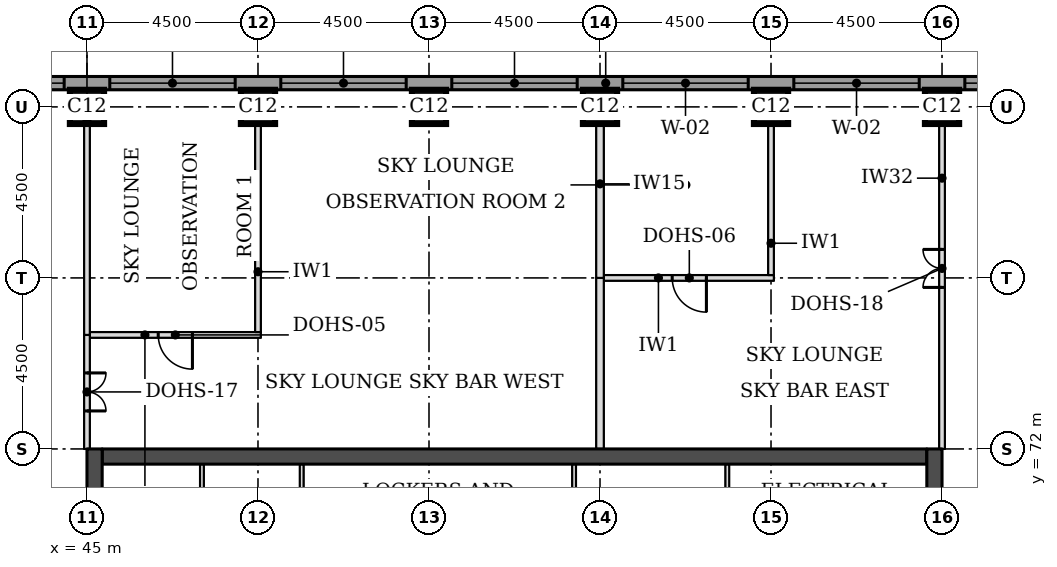
"""IFC4 building model, lengths in metres.
Left out: names, types, materials, properties, quantities, classifications, styles, units other than length and angle.
Written with IfcOpenShell. Run it as: python <this file> out.ifc"""

import sys

from ifc_helpers import new_model, si_unit, direction, frame, frame_2d, origin, origin_2d, place, context, subcontext, project, spatial, rectangle, extrude, element, fill, save


model = new_model("IFC4")
c1 = context("Model", 3, precision=1e-05, world=origin(), true_north=direction((0.0, 1.0)))
c2 = subcontext(c1, "Body", "Model", "MODEL_VIEW")
j1 = project(units=[si_unit("LENGTHUNIT", "METRE"), si_unit("PLANEANGLEUNIT", "RADIAN")], contexts=[c1])
p1 = place(None, origin())
s1 = spatial("IfcSite", under=j1, at=p1, CompositionType="ELEMENT")
p2 = place(p1, origin())
s2 = spatial("IfcBuilding", under=s1, at=p2, CompositionType="ELEMENT")
p3 = place(p2, frame((0.0, 0.0, 260.0)))
s3 = spatial("IfcBuildingStorey", under=s2, at=p3, CompositionType="ELEMENT", Elevation=260.0)
for number, where, z_axis, x_axis in (
    (1, (45.0, 81.0, 0.0), (0.0, 0.0, 1.0), (1.0, 0.0, 0.0)),
    (2, (49.5, 81.0, 0.0), (0.0, 0.0, 1.0), (1.0, 0.0, 0.0)),
    (3, (54.0, 81.0, 0.0), (0.0, 0.0, 1.0), (1.0, 0.0, 0.0)),
    (4, (58.5, 81.0, 0.0), (0.0, 0.0, 1.0), (1.0, 0.0, 0.0)),
    (5, (63.0, 81.0, 0.0), (0.0, 0.0, 1.0), (1.0, 0.0, 0.0)),
    (6, (67.5, 81.0, 0.0), (0.0, 0.0, 1.0), (1.0, 0.0, 0.0)),
):
    element("IfcColumn", number, at=place(p3, frame(where, z_axis=z_axis, x_axis=x_axis)), inside=s3, PredefinedType="COLUMN", context=c2, shape_type="SweptSolid", body=[
        extrude(rectangle(XDim=0.9, YDim=0.9, at=origin_2d()), origin(), (0.0, 0.0, 1.0), 3.7),
    ])
p4 = place(p3, frame((45.4, 71.8, 0.0), z_axis=(0.0, 0.0, 1.0), x_axis=(1.0, 0.0, 0.0)))
e7 = element("IfcWall", 7, at=p4, inside=s3, PredefinedType="SHEAR", context=c2, shape_type="SweptSolid", body=[
    extrude(rectangle(XDim=21.7, YDim=0.4, at=frame_2d((10.85, 0.0))), origin(), (0.0, 0.0, 1.0), 3.7),
])
p5 = place(p3, frame((45.2, 49.5, 0.0), z_axis=(0.0, 0.0, 1.0), x_axis=(0.0, 1.0, 0.0)))
e8 = element("IfcWall", 8, at=p5, inside=s3, PredefinedType="SHEAR", context=c2, shape_type="SweptSolid", body=[
    extrude(rectangle(XDim=22.5, YDim=0.4, at=frame_2d((11.25, 0.0))), origin(), (0.0, 0.0, 1.0), 3.7),
])
p6 = place(p5, frame((4.2, 0.0, 0.0)))
e9 = element("IfcOpeningElement", 9, at=p6, cuts=e8, PredefinedType="OPENING", context=c2, shape_type="SweptSolid", body=[
    extrude(rectangle(XDim=1.8, YDim=2.1, at=frame_2d((0.9, 1.05))), frame((0.0, 0.21, 0.0), z_axis=(0.0, -1.0, 0.0), x_axis=(1.0, 0.0, 0.0)), (0.0, 0.0, 1.0), 0.42),
])
p7 = place(p5, frame((6.9, 0.0, 0.0)))
e10 = element("IfcOpeningElement", 10, at=p7, cuts=e8, PredefinedType="OPENING", context=c2, shape_type="SweptSolid", body=[
    extrude(rectangle(XDim=1.1, YDim=2.1, at=frame_2d((0.55, 1.05))), frame((0.0, 0.21, 0.0), z_axis=(0.0, -1.0, 0.0), x_axis=(1.0, 0.0, 0.0)), (0.0, 0.0, 1.0), 0.42),
])
p8 = place(p5, frame((13.6, 0.0, 0.0)))
e11 = element("IfcOpeningElement", 11, at=p8, cuts=e8, PredefinedType="OPENING", context=c2, shape_type="SweptSolid", body=[
    extrude(rectangle(XDim=1.1, YDim=2.1, at=frame_2d((0.55, 1.05))), frame((0.0, 0.21, 0.0), z_axis=(0.0, -1.0, 0.0), x_axis=(1.0, 0.0, 0.0)), (0.0, 0.0, 1.0), 0.42),
])
p9 = place(p5, frame((16.5, 0.0, 0.0)))
e12 = element("IfcOpeningElement", 12, at=p9, cuts=e8, PredefinedType="OPENING", context=c2, shape_type="SweptSolid", body=[
    extrude(rectangle(XDim=1.8, YDim=2.1, at=frame_2d((0.9, 1.05))), frame((0.0, 0.21, 0.0), z_axis=(0.0, -1.0, 0.0), x_axis=(1.0, 0.0, 0.0)), (0.0, 0.0, 1.0), 0.42),
])
p10 = place(p3, frame((67.3, 49.5, 0.0), z_axis=(0.0, 0.0, 1.0), x_axis=(0.0, 1.0, 0.0)))
e13 = element("IfcWall", 13, at=p10, inside=s3, PredefinedType="SHEAR", context=c2, shape_type="SweptSolid", body=[
    extrude(rectangle(XDim=22.5, YDim=0.4, at=frame_2d((11.25, 0.0))), origin(), (0.0, 0.0, 1.0), 3.7),
])
p11 = place(p10, frame((4.2, 0.0, 0.0)))
e14 = element("IfcOpeningElement", 14, at=p11, cuts=e13, PredefinedType="OPENING", context=c2, shape_type="SweptSolid", body=[
    extrude(rectangle(XDim=1.8, YDim=2.1, at=frame_2d((0.9, 1.05))), frame((0.0, 0.21, 0.0), z_axis=(0.0, -1.0, 0.0), x_axis=(1.0, 0.0, 0.0)), (0.0, 0.0, 1.0), 0.42),
])
p12 = place(p10, frame((6.9, 0.0, 0.0)))
e15 = element("IfcOpeningElement", 15, at=p12, cuts=e13, PredefinedType="OPENING", context=c2, shape_type="SweptSolid", body=[
    extrude(rectangle(XDim=1.1, YDim=2.1, at=frame_2d((0.55, 1.05))), frame((0.0, 0.21, 0.0), z_axis=(0.0, -1.0, 0.0), x_axis=(1.0, 0.0, 0.0)), (0.0, 0.0, 1.0), 0.42),
])
p13 = place(p10, frame((13.6, 0.0, 0.0)))
e16 = element("IfcOpeningElement", 16, at=p13, cuts=e13, PredefinedType="OPENING", context=c2, shape_type="SweptSolid", body=[
    extrude(rectangle(XDim=1.1, YDim=2.1, at=frame_2d((0.55, 1.05))), frame((0.0, 0.21, 0.0), z_axis=(0.0, -1.0, 0.0), x_axis=(1.0, 0.0, 0.0)), (0.0, 0.0, 1.0), 0.42),
])
p14 = place(p10, frame((16.5, 0.0, 0.0)))
e17 = element("IfcOpeningElement", 17, at=p14, cuts=e13, PredefinedType="OPENING", context=c2, shape_type="SweptSolid", body=[
    extrude(rectangle(XDim=1.8, YDim=2.1, at=frame_2d((0.9, 1.05))), frame((0.0, 0.21, 0.0), z_axis=(0.0, -1.0, 0.0), x_axis=(1.0, 0.0, 0.0)), (0.0, 0.0, 1.0), 0.42),
])
p15 = place(p3, frame((72.331, 81.625, 0.0), z_axis=(0.0, 0.0, 1.0), x_axis=(-1.0, 0.0, 0.0)))
e18 = element("IfcWall", 18, at=p15, inside=s3, PredefinedType="STANDARD", context=c2, shape_type="SweptSolid", body=[
    extrude(rectangle(XDim=32.163, YDim=0.35, at=frame_2d((16.081, 0.0))), origin(), (0.0, 0.0, 1.0), 3.425),
])
p16 = place(p15, frame((0.931, 0.0, 0.9)))
e19 = element("IfcOpeningElement", 19, at=p16, cuts=e18, PredefinedType="OPENING", context=c2, shape_type="SweptSolid", body=[
    extrude(rectangle(XDim=3.3, YDim=1.9, at=frame_2d((1.65, 0.95))), frame((0.0, 0.185, 0.0), z_axis=(0.0, -1.0, 0.0), x_axis=(1.0, 0.0, 0.0)), (0.0, 0.0, 1.0), 0.37),
])
p17 = place(p15, frame((5.431, 0.0, 0.9)))
e20 = element("IfcOpeningElement", 20, at=p17, cuts=e18, PredefinedType="OPENING", context=c2, shape_type="SweptSolid", body=[
    extrude(rectangle(XDim=3.3, YDim=1.9, at=frame_2d((1.65, 0.95))), frame((0.0, 0.185, 0.0), z_axis=(0.0, -1.0, 0.0), x_axis=(1.0, 0.0, 0.0)), (0.0, 0.0, 1.0), 0.37),
])
p18 = place(p15, frame((9.931, 0.0, 0.9)))
e21 = element("IfcOpeningElement", 21, at=p18, cuts=e18, PredefinedType="OPENING", context=c2, shape_type="SweptSolid", body=[
    extrude(rectangle(XDim=3.3, YDim=1.9, at=frame_2d((1.65, 0.95))), frame((0.0, 0.185, 0.0), z_axis=(0.0, -1.0, 0.0), x_axis=(1.0, 0.0, 0.0)), (0.0, 0.0, 1.0), 0.37),
])
p19 = place(p15, frame((14.431, 0.0, 0.9)))
e22 = element("IfcOpeningElement", 22, at=p19, cuts=e18, PredefinedType="OPENING", context=c2, shape_type="SweptSolid", body=[
    extrude(rectangle(XDim=3.3, YDim=1.9, at=frame_2d((1.65, 0.95))), frame((0.0, 0.185, 0.0), z_axis=(0.0, -1.0, 0.0), x_axis=(1.0, 0.0, 0.0)), (0.0, 0.0, 1.0), 0.37),
])
p20 = place(p15, frame((18.931, 0.0, 0.9)))
e23 = element("IfcOpeningElement", 23, at=p20, cuts=e18, PredefinedType="OPENING", context=c2, shape_type="SweptSolid", body=[
    extrude(rectangle(XDim=3.3, YDim=1.9, at=frame_2d((1.65, 0.95))), frame((0.0, 0.185, 0.0), z_axis=(0.0, -1.0, 0.0), x_axis=(1.0, 0.0, 0.0)), (0.0, 0.0, 1.0), 0.37),
])
p21 = place(p15, frame((23.431, 0.0, 0.9)))
e24 = element("IfcOpeningElement", 24, at=p21, cuts=e18, PredefinedType="OPENING", context=c2, shape_type="SweptSolid", body=[
    extrude(rectangle(XDim=3.3, YDim=1.9, at=frame_2d((1.65, 0.95))), frame((0.0, 0.185, 0.0), z_axis=(0.0, -1.0, 0.0), x_axis=(1.0, 0.0, 0.0)), (0.0, 0.0, 1.0), 0.37),
])
p22 = place(p15, frame((27.931, 0.0, 0.9)))
e25 = element("IfcOpeningElement", 25, at=p22, cuts=e18, PredefinedType="OPENING", context=c2, shape_type="SweptSolid", body=[
    extrude(rectangle(XDim=3.3, YDim=1.9, at=frame_2d((1.65, 0.95))), frame((0.0, 0.185, 0.0), z_axis=(0.0, -1.0, 0.0), x_axis=(1.0, 0.0, 0.0)), (0.0, 0.0, 1.0), 0.37),
])
p23 = place(p3, frame((45.075, 75.0, 0.0), z_axis=(0.0, 0.0, 1.0), x_axis=(1.0, 0.0, 0.0)))
e26 = element("IfcWall", 26, at=p23, inside=s3, PredefinedType="PARTITIONING", context=c2, shape_type="SweptSolid", body=[
    extrude(rectangle(XDim=4.5, YDim=0.15, at=frame_2d((2.25, 0.0))), origin(), (0.0, 0.0, 1.0), 3.45),
])
p24 = place(p23, frame((1.8, 0.0, 0.0)))
e27 = element("IfcOpeningElement", 27, at=p24, cuts=e26, PredefinedType="OPENING", context=c2, shape_type="SweptSolid", body=[
    extrude(rectangle(XDim=0.9, YDim=2.1, at=frame_2d((0.45, 1.05))), frame((0.0, 0.085, 0.0), z_axis=(0.0, -1.0, 0.0), x_axis=(1.0, 0.0, 0.0)), (0.0, 0.0, 1.0), 0.17),
])
p25 = place(p3, frame((58.6, 76.5, 0.0), z_axis=(0.0, 0.0, 1.0), x_axis=(1.0, 0.0, 0.0)))
e28 = element("IfcWall", 28, at=p25, inside=s3, PredefinedType="PARTITIONING", context=c2, shape_type="SweptSolid", body=[
    extrude(rectangle(XDim=4.475, YDim=0.15, at=frame_2d((2.237, 0.0))), origin(), (0.0, 0.0, 1.0), 3.45),
])
p26 = place(p25, frame((1.8, 0.0, 0.0)))
e29 = element("IfcOpeningElement", 29, at=p26, cuts=e28, PredefinedType="OPENING", context=c2, shape_type="SweptSolid", body=[
    extrude(rectangle(XDim=0.9, YDim=2.1, at=frame_2d((0.45, 1.05))), frame((0.0, 0.085, 0.0), z_axis=(0.0, -1.0, 0.0), x_axis=(1.0, 0.0, 0.0)), (0.0, 0.0, 1.0), 0.17),
])
p27 = place(p3, frame((45.0, 72.0, 0.0), z_axis=(0.0, 0.0, 1.0), x_axis=(0.0, 1.0, 0.0)))
e30 = element("IfcWall", 30, at=p27, inside=s3, PredefinedType="PARTITIONING", context=c2, shape_type="SweptSolid", body=[
    extrude(rectangle(XDim=3.0, YDim=0.15, at=frame_2d((1.5, 0.0))), origin(), (0.0, 0.0, 1.0), 2.922),
])
p28 = place(p27, frame((1.0, 0.0, 0.0)))
e31 = element("IfcOpeningElement", 31, at=p28, cuts=e30, PredefinedType="OPENING", context=c2, shape_type="SweptSolid", body=[
    extrude(rectangle(XDim=1.0, YDim=2.1, at=frame_2d((0.5, 1.05))), frame((0.0, 0.085, 0.0), z_axis=(0.0, -1.0, 0.0), x_axis=(1.0, 0.0, 0.0)), (0.0, 0.0, 1.0), 0.17),
])
p29 = place(p3, frame((58.5, 72.0, 0.0), z_axis=(0.0, 0.0, 1.0), x_axis=(0.0, 1.0, 0.0)))
e32 = element("IfcWall", 32, at=p29, inside=s3, PredefinedType="PARTITIONING", context=c2, shape_type="SweptSolid", body=[
    extrude(rectangle(XDim=4.5, YDim=0.2, at=frame_2d((2.25, 0.0))), origin(), (0.0, 0.0, 1.0), 3.45),
])
p30 = place(p3, frame((67.5, 72.0, 0.0), z_axis=(0.0, 0.0, 1.0), x_axis=(0.0, 1.0, 0.0)))
e33 = element("IfcWall", 33, at=p30, inside=s3, PredefinedType="PARTITIONING", context=c2, shape_type="SweptSolid", body=[
    extrude(rectangle(XDim=9.45, YDim=0.15, at=frame_2d((4.725, 0.0))), origin(), (0.0, 0.0, 1.0), 2.922),
])
p31 = place(p30, frame((4.25, 0.0, 0.0)))
e34 = element("IfcOpeningElement", 34, at=p31, cuts=e33, PredefinedType="OPENING", context=c2, shape_type="SweptSolid", body=[
    extrude(rectangle(XDim=1.0, YDim=2.1, at=frame_2d((0.5, 1.05))), frame((0.0, 0.085, 0.0), z_axis=(0.0, -1.0, 0.0), x_axis=(1.0, 0.0, 0.0)), (0.0, 0.0, 1.0), 0.17),
])
p32 = place(p3, frame((45.0, 75.0, 0.0), z_axis=(0.0, 0.0, 1.0), x_axis=(0.0, 1.0, 0.0)))
e35 = element("IfcWall", 35, at=p32, inside=s3, PredefinedType="PARTITIONING", context=c2, shape_type="SweptSolid", body=[
    extrude(rectangle(XDim=6.45, YDim=0.15, at=frame_2d((3.225, 0.0))), origin(), (0.0, 0.0, 1.0), 2.922),
])
p33 = place(p3, frame((49.5, 75.075, 0.0), z_axis=(0.0, 0.0, 1.0), x_axis=(0.0, 1.0, 0.0)))
e36 = element("IfcWall", 36, at=p33, inside=s3, PredefinedType="PARTITIONING", context=c2, shape_type="SweptSolid", body=[
    extrude(rectangle(XDim=6.375, YDim=0.15, at=frame_2d((3.188, 0.0))), origin(), (0.0, 0.0, 1.0), 3.45),
])
p34 = place(p3, frame((58.5, 76.5, 0.0), z_axis=(0.0, 0.0, 1.0), x_axis=(0.0, 1.0, 0.0)))
e37 = element("IfcWall", 37, at=p34, inside=s3, PredefinedType="PARTITIONING", context=c2, shape_type="SweptSolid", body=[
    extrude(rectangle(XDim=4.95, YDim=0.2, at=frame_2d((2.475, 0.0))), origin(), (0.0, 0.0, 1.0), 3.45),
])
p35 = place(p3, frame((63.0, 76.575, 0.0), z_axis=(0.0, 0.0, 1.0), x_axis=(0.0, 1.0, 0.0)))
e38 = element("IfcWall", 38, at=p35, inside=s3, PredefinedType="PARTITIONING", context=c2, shape_type="SweptSolid", body=[
    extrude(rectangle(XDim=4.875, YDim=0.15, at=frame_2d((2.438, 0.0))), origin(), (0.0, 0.0, 1.0), 3.45),
])
for number, where, z_axis, x_axis in (
    (39, (48.025, 68.5, 0.0), (0.0, 0.0, 1.0), (0.0, 1.0, 0.0)),
    (40, (50.65, 68.5, 0.0), (0.0, 0.0, 1.0), (0.0, 1.0, 0.0)),
    (41, (57.818, 68.5, 0.0), (0.0, 0.0, 1.0), (0.0, 1.0, 0.0)),
    (42, (61.85, 68.5, 0.0), (0.0, 0.0, 1.0), (0.0, 1.0, 0.0)),
):
    element("IfcWall", number, at=place(p3, frame(where, z_axis=z_axis, x_axis=x_axis)), inside=s3, PredefinedType="PARTITIONING", context=c2, shape_type="SweptSolid", body=[
        extrude(rectangle(XDim=3.1, YDim=0.1, at=frame_2d((1.55, 0.0))), origin(), (0.0, 0.0, 1.0), 3.45),
    ])
p36 = place(p16, origin())
e43 = element("IfcWindow", 43, at=p36, inside=s3, PartitioningType="SINGLE_PANEL", PredefinedType="WINDOW", context=c2, shape_type="SweptSolid", body=[
    extrude(rectangle(XDim=3.3, YDim=1.9, at=frame_2d((1.65, 0.95))), frame((0.0, 0.085, 0.0), z_axis=(0.0, -1.0, 0.0), x_axis=(1.0, 0.0, 0.0)), (0.0, 0.0, 1.0), 0.06),
])
fill(e19, e43)
p37 = place(p17, origin())
e44 = element("IfcWindow", 44, at=p37, inside=s3, PartitioningType="SINGLE_PANEL", PredefinedType="WINDOW", context=c2, shape_type="SweptSolid", body=[
    extrude(rectangle(XDim=3.3, YDim=1.9, at=frame_2d((1.65, 0.95))), frame((0.0, 0.085, 0.0), z_axis=(0.0, -1.0, 0.0), x_axis=(1.0, 0.0, 0.0)), (0.0, 0.0, 1.0), 0.06),
])
fill(e20, e44)
p38 = place(p18, origin())
e45 = element("IfcWindow", 45, at=p38, inside=s3, PartitioningType="SINGLE_PANEL", PredefinedType="WINDOW", context=c2, shape_type="SweptSolid", body=[
    extrude(rectangle(XDim=3.3, YDim=1.9, at=frame_2d((1.65, 0.95))), frame((0.0, 0.085, 0.0), z_axis=(0.0, -1.0, 0.0), x_axis=(1.0, 0.0, 0.0)), (0.0, 0.0, 1.0), 0.06),
])
fill(e21, e45)
p39 = place(p19, origin())
e46 = element("IfcWindow", 46, at=p39, inside=s3, PartitioningType="SINGLE_PANEL", PredefinedType="WINDOW", context=c2, shape_type="SweptSolid", body=[
    extrude(rectangle(XDim=3.3, YDim=1.9, at=frame_2d((1.65, 0.95))), frame((0.0, 0.085, 0.0), z_axis=(0.0, -1.0, 0.0), x_axis=(1.0, 0.0, 0.0)), (0.0, 0.0, 1.0), 0.06),
])
fill(e22, e46)
p40 = place(p20, origin())
e47 = element("IfcWindow", 47, at=p40, inside=s3, PartitioningType="SINGLE_PANEL", PredefinedType="WINDOW", context=c2, shape_type="SweptSolid", body=[
    extrude(rectangle(XDim=3.3, YDim=1.9, at=frame_2d((1.65, 0.95))), frame((0.0, 0.085, 0.0), z_axis=(0.0, -1.0, 0.0), x_axis=(1.0, 0.0, 0.0)), (0.0, 0.0, 1.0), 0.06),
])
fill(e23, e47)
p41 = place(p21, origin())
e48 = element("IfcWindow", 48, at=p41, inside=s3, PartitioningType="SINGLE_PANEL", PredefinedType="WINDOW", context=c2, shape_type="SweptSolid", body=[
    extrude(rectangle(XDim=3.3, YDim=1.9, at=frame_2d((1.65, 0.95))), frame((0.0, 0.085, 0.0), z_axis=(0.0, -1.0, 0.0), x_axis=(1.0, 0.0, 0.0)), (0.0, 0.0, 1.0), 0.06),
])
fill(e24, e48)
p42 = place(p22, origin())
e49 = element("IfcWindow", 49, at=p42, inside=s3, PartitioningType="SINGLE_PANEL", PredefinedType="WINDOW", context=c2, shape_type="SweptSolid", body=[
    extrude(rectangle(XDim=3.3, YDim=1.9, at=frame_2d((1.65, 0.95))), frame((0.0, 0.085, 0.0), z_axis=(0.0, -1.0, 0.0), x_axis=(1.0, 0.0, 0.0)), (0.0, 0.0, 1.0), 0.06),
])
fill(e25, e49)
p43 = place(p28, frame((1.0, 0.0, 0.0), z_axis=(0.0, 0.0, 1.0), x_axis=(-1.0, 0.0, 0.0)))
e50 = element("IfcDoor", 50, at=p43, inside=s3, OperationType="DOUBLE_DOOR_SINGLE_SWING", PredefinedType="DOOR", context=c2, shape_type="SweptSolid", body=[
    extrude(rectangle(XDim=1.0, YDim=2.1, at=frame_2d((0.5, 1.05))), frame((0.0, 0.025, 0.0), z_axis=(0.0, -1.0, 0.0), x_axis=(1.0, 0.0, 0.0)), (0.0, 0.0, 1.0), 0.05),
])
fill(e31, e50)
p44 = place(p24, frame((0.9, 0.0, 0.0), z_axis=(0.0, 0.0, 1.0), x_axis=(-1.0, 0.0, 0.0)))
e51 = element("IfcDoor", 51, at=p44, inside=s3, OperationType="SINGLE_SWING_LEFT", PredefinedType="DOOR", context=c2, shape_type="SweptSolid", body=[
    extrude(rectangle(XDim=0.9, YDim=2.1, at=frame_2d((0.45, 1.05))), frame((0.0, 0.025, 0.0), z_axis=(0.0, -1.0, 0.0), x_axis=(1.0, 0.0, 0.0)), (0.0, 0.0, 1.0), 0.05),
])
fill(e27, e51)
p45 = place(p31, origin())
e52 = element("IfcDoor", 52, at=p45, inside=s3, OperationType="DOUBLE_DOOR_SINGLE_SWING", PredefinedType="DOOR", context=c2, shape_type="SweptSolid", body=[
    extrude(rectangle(XDim=1.0, YDim=2.1, at=frame_2d((0.5, 1.05))), frame((0.0, 0.025, 0.0), z_axis=(0.0, -1.0, 0.0), x_axis=(1.0, 0.0, 0.0)), (0.0, 0.0, 1.0), 0.05),
])
fill(e34, e52)
p46 = place(p26, frame((0.9, 0.0, 0.0), z_axis=(0.0, 0.0, 1.0), x_axis=(-1.0, 0.0, 0.0)))
e53 = element("IfcDoor", 53, at=p46, inside=s3, OperationType="SINGLE_SWING_LEFT", PredefinedType="DOOR", context=c2, shape_type="SweptSolid", body=[
    extrude(rectangle(XDim=0.9, YDim=2.1, at=frame_2d((0.45, 1.05))), frame((0.0, 0.025, 0.0), z_axis=(0.0, -1.0, 0.0), x_axis=(1.0, 0.0, 0.0)), (0.0, 0.0, 1.0), 0.05),
])
fill(e29, e53)
save(model, sys.argv[1])
